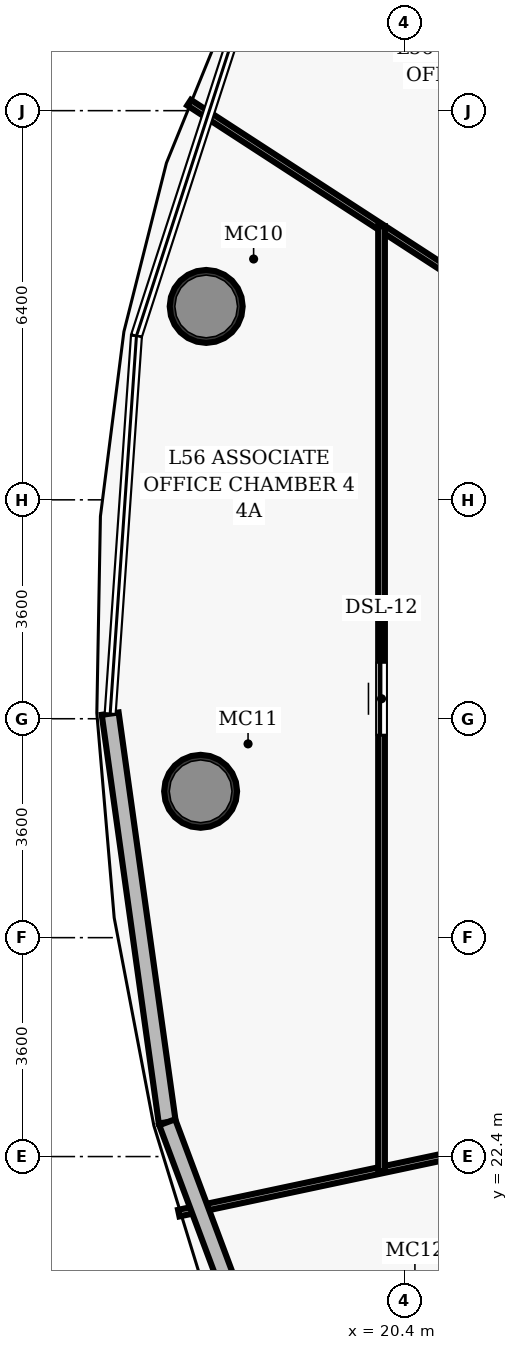
"""IFC4 building model, lengths in metres.
Left out: names, types, materials, properties, quantities, classifications, styles, units other than length and angle.
Written with IfcOpenShell. Run it as: python <this file> out.ifc"""

import sys

from ifc_helpers import new_model, si_unit, direction, frame, frame_2d, origin, origin_2d, place, context, subcontext, project, spatial, rectangle, hollow_circle, extrude, element, fill, save


model = new_model("IFC4")
c1 = context("Model", 3, precision=1e-05, world=origin(), true_north=direction((0.0, 1.0)))
c2 = subcontext(c1, "Body", "Model", "MODEL_VIEW")
j1 = project(units=[si_unit("LENGTHUNIT", "METRE"), si_unit("PLANEANGLEUNIT", "RADIAN")], contexts=[c1])
p1 = place(None, origin())
s1 = spatial("IfcSite", under=j1, at=p1, CompositionType="ELEMENT")
p2 = place(p1, origin())
s2 = spatial("IfcBuilding", under=s1, at=p2, CompositionType="ELEMENT")
p3 = place(p2, frame((0.0, 0.0, 221.25)))
s3 = spatial("IfcBuildingStorey", under=s2, at=p3, CompositionType="ELEMENT", Elevation=221.25)
for number, where, z_axis, x_axis in (
    (1, (17.137, 36.381, 0.0), (0.0, 0.0, 1.0), (1.0, 0.0, 0.0)),
    (2, (17.045, 28.406, 0.0), (0.0, 0.0, 1.0), (1.0, 0.0, 0.0)),
):
    element("IfcColumn", number, at=place(p3, frame(where, z_axis=z_axis, x_axis=x_axis)), inside=s3, PredefinedType="COLUMN", context=c2, shape_type="SweptSolid", body=[
        extrude(hollow_circle(Radius=0.6, WallThickness=0.05, at=origin_2d()), origin(), (0.0, 0.0, 1.0), 3.85),
    ])
p4 = place(p3, frame((24.66, 34.663, 0.0), z_axis=(0.0, 0.0, 1.0), x_axis=(-0.838669505623, 0.544640670845, 0.0)))
e3 = element("IfcWall", 3, at=p4, inside=s3, PredefinedType="PARTITIONING", context=c2, shape_type="SweptSolid", body=[
    extrude(rectangle(XDim=9.306, YDim=0.11, at=frame_2d((4.653, 0.0))), origin(), (0.0, 0.0, 1.0), 3.035),
])
p5 = place(p3, frame((24.66, 23.165, 0.0), z_axis=(0.0, 0.0, 1.0), x_axis=(-0.978144691983, -0.207925374944, 0.0)))
e4 = element("IfcWall", 4, at=p5, inside=s3, PredefinedType="PARTITIONING", context=c2, shape_type="SweptSolid", body=[
    extrude(rectangle(XDim=8.152, YDim=0.11, at=frame_2d((4.076, 0.0))), origin(), (0.0, 0.0, 1.0), 3.035),
])
p6 = place(p3, frame((20.021, 22.158, 0.0), z_axis=(0.0, 0.0, 1.0), x_axis=(0.0, 1.0, 0.0)))
e5 = element("IfcWall", 5, at=p6, inside=s3, PredefinedType="PARTITIONING", context=c2, shape_type="SweptSolid", body=[
    extrude(rectangle(XDim=15.542, YDim=0.11, at=frame_2d((7.771, 0.0))), origin(), (0.0, 0.0, 1.0), 3.035),
])
p7 = place(p6, frame((7.171, 0.0, 0.0)))
e6 = element("IfcOpeningElement", 6, at=p7, cuts=e5, PredefinedType="OPENING", context=c2, shape_type="SweptSolid", body=[
    extrude(rectangle(XDim=1.2, YDim=2.15, at=frame_2d((0.6, 1.075))), frame((0.0, 0.065, 0.0), z_axis=(0.0, -1.0, 0.0), x_axis=(1.0, 0.0, 0.0)), (0.0, 0.0, 1.0), 0.13),
])
p8 = place(p3, frame((16.496, 22.965, 0.0), z_axis=(0.0, 0.0, 1.0), x_axis=(-0.13825677768, 0.990396417313, 0.0)))
e7 = element("IfcWall", 7, at=p8, inside=s3, PredefinedType="SOLIDWALL", context=c2, shape_type="SweptSolid", body=[
    extrude(rectangle(XDim=6.784, YDim=0.28, at=frame_2d((3.392, 0.0))), origin(), (0.0, 0.0, 1.0), 3.62),
])
p9 = place(p3, frame((18.955, 16.392, 0.0), z_axis=(0.0, 0.0, 1.0), x_axis=(-0.350357019434, 0.936616228203, 0.0)))
e8 = element("IfcWall", 8, at=p9, inside=s3, PredefinedType="SOLIDWALL", context=c2, shape_type="SweptSolid", body=[
    extrude(rectangle(XDim=7.018, YDim=0.28, at=frame_2d((3.509, 0.0))), origin(), (0.0, 0.0, 1.0), 3.62),
])
p10 = place(p7, origin())
e9 = element("IfcDoor", 9, at=p10, inside=s3, OperationType="SLIDING_TO_RIGHT", PredefinedType="DOOR", context=c2, shape_type="SweptSolid", body=[
    extrude(rectangle(XDim=1.2, YDim=2.15, at=frame_2d((0.6, 1.075))), frame((0.0, 0.025, 0.0), z_axis=(0.0, -1.0, 0.0), x_axis=(1.0, 0.0, 0.0)), (0.0, 0.0, 1.0), 0.05),
])
fill(e6, e9)
save(model, sys.argv[1])
